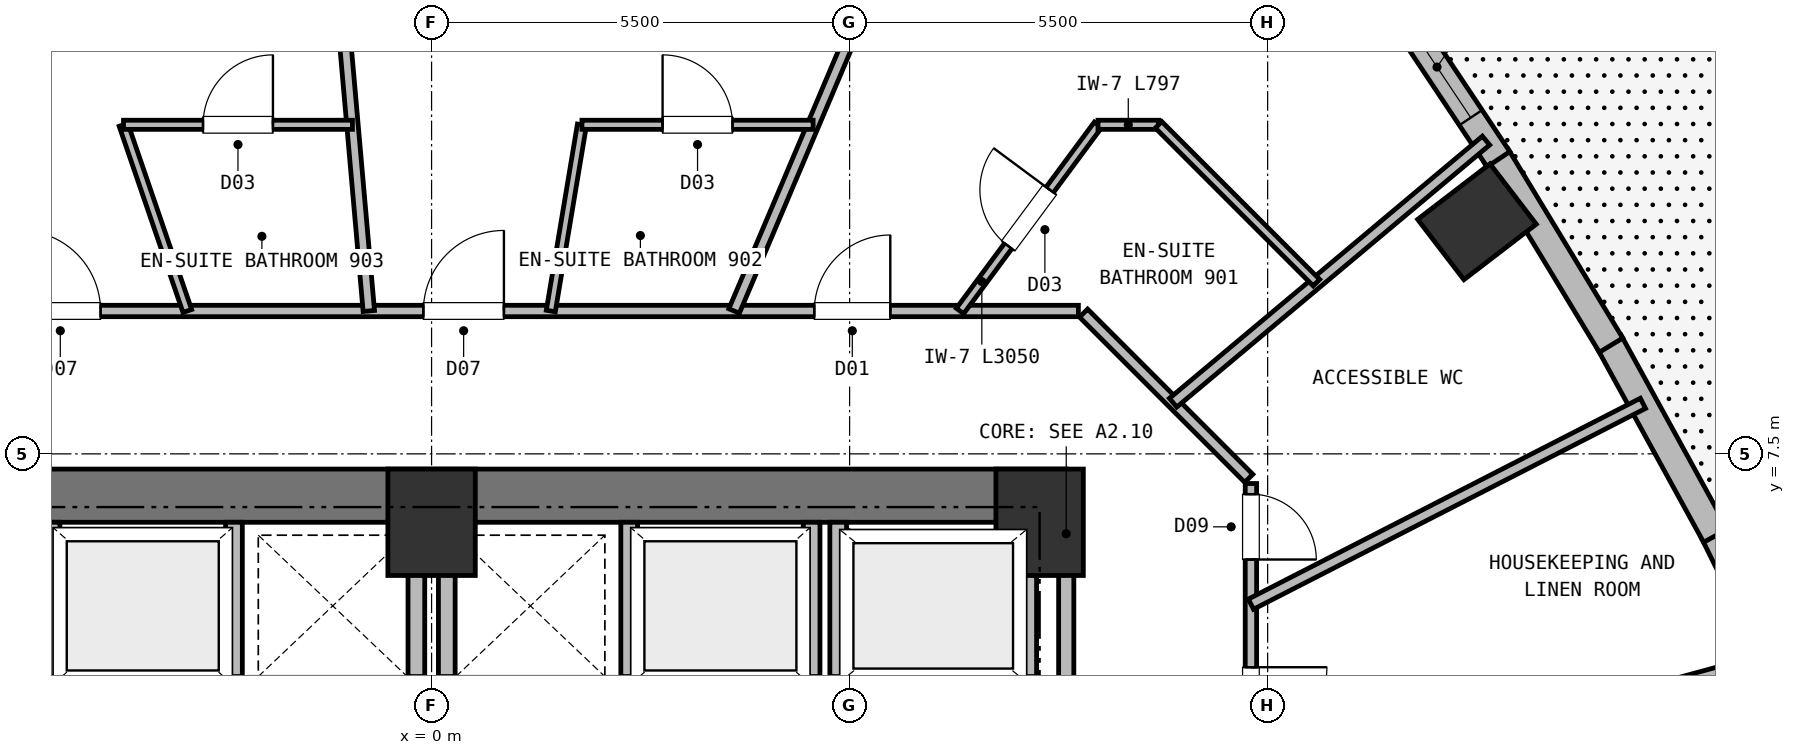
"""IFC4 building model, lengths in metres.
Left out: names, types, materials, properties, quantities, classifications, styles, units other than length and angle.
Written with IfcOpenShell. Run it as: python <this file> out.ifc"""

import sys

from ifc_helpers import new_model, si_unit, direction, frame, frame_2d, origin, origin_2d, place, context, subcontext, project, spatial, rectangle, extrude, element, fill, save


model = new_model("IFC4")
c1 = context("Model", 3, precision=1e-05, world=origin(), true_north=direction((0.0, 1.0)))
c2 = subcontext(c1, "Body", "Model", "MODEL_VIEW")
j1 = project(units=[si_unit("LENGTHUNIT", "METRE"), si_unit("PLANEANGLEUNIT", "RADIAN")], contexts=[c1])
p1 = place(None, origin())
s1 = spatial("IfcSite", under=j1, at=p1, CompositionType="ELEMENT")
p2 = place(p1, origin())
s2 = spatial("IfcBuilding", under=s1, at=p2, CompositionType="ELEMENT")
p3 = place(p2, frame((0.0, 0.0, 30.5)))
s3 = spatial("IfcBuildingStorey", under=s2, at=p3, CompositionType="ELEMENT", Elevation=30.5)
for number, where, z_axis, x_axis in (
    (1, (8.0, 6.6, 0.0), (0.0, 0.0, 1.0), (1.0, 0.0, 0.0)),
    (2, (0.0, 6.6, 0.0), (0.0, 0.0, 1.0), (1.0, 0.0, 0.0)),
):
    element("IfcColumn", number, at=place(p3, frame(where, z_axis=z_axis, x_axis=x_axis)), inside=s3, PredefinedType="COLUMN", context=c2, shape_type="SweptSolid", body=[
        extrude(rectangle(XDim=1.15, YDim=1.4, at=origin_2d()), origin(), (0.0, 0.0, 1.0), 3.75),
    ])
p4 = place(p3, frame((-8.35, 6.95, 0.0), z_axis=(0.0, 0.0, 1.0), x_axis=(1.0, 0.0, 0.0)))
e3 = element("IfcWall", 3, at=p4, inside=s3, PredefinedType="SHEAR", context=c2, shape_type="SweptSolid", body=[
    extrude(rectangle(XDim=16.7, YDim=0.7, at=frame_2d((8.35, 0.0))), origin(), (0.0, 0.0, 1.0), 3.5),
])
p5 = place(p3, frame((13.754, 10.554, 0.0), z_axis=(0.0, 0.0, 1.0), x_axis=(-0.608761429009, 0.793353340291, 0.0)))
e4 = element("IfcColumn", 4, at=p5, inside=s3, PredefinedType="COLUMN", context=c2, shape_type="SweptSolid", body=[
    extrude(rectangle(XDim=1.0, YDim=1.2, at=origin_2d()), origin(), (0.0, 0.0, 1.0), 3.75),
])
p6 = place(p3, frame((16.871, 6.468, 0.0), z_axis=(0.0, 0.0, 1.0), x_axis=(0.44365878996, -0.896195781117, 0.0)))
e5 = element("IfcWall", 5, at=p6, inside=s3, PredefinedType="SOLIDWALL", context=c2, shape_type="SweptSolid", body=[
    extrude(rectangle(XDim=2.915, YDim=0.36, at=frame_2d((1.458, 0.0))), origin(), (0.0, 0.0, 1.0), 3.5),
])
p7 = place(p3, frame((15.493, 8.974, 0.0), z_axis=(0.0, 0.0, 1.0), x_axis=(0.481319495438, -0.876545231754, 0.0)))
e6 = element("IfcWall", 6, at=p7, inside=s3, PredefinedType="SOLIDWALL", context=c2, shape_type="SweptSolid", body=[
    extrude(rectangle(XDim=2.909, YDim=0.36, at=frame_2d((1.455, 0.0))), origin(), (0.0, 0.0, 1.0), 3.5),
])
p8 = place(p3, frame((14.01, 11.419, 0.0), z_axis=(0.0, 0.0, 1.0), x_axis=(0.518463491903, -0.855099764685, 0.0)))
e7 = element("IfcWall", 7, at=p8, inside=s3, PredefinedType="SOLIDWALL", context=c2, shape_type="SweptSolid", body=[
    extrude(rectangle(XDim=2.91, YDim=0.36, at=frame_2d((1.455, 0.0))), origin(), (0.0, 0.0, 1.0), 3.5),
])
p9 = place(p3, frame((12.421, 13.802, 0.0), z_axis=(0.0, 0.0, 1.0), x_axis=(0.554410222631, -0.832243537099, 0.0)))
e8 = element("IfcWall", 8, at=p9, inside=s3, PredefinedType="SOLIDWALL", context=c2, shape_type="SweptSolid", body=[
    extrude(rectangle(XDim=2.915, YDim=0.36, at=frame_2d((1.458, 0.0))), origin(), (0.0, 0.0, 1.0), 3.5),
])
p10 = place(p9, frame((0.657, 0.0, 0.72)))
e9 = element("IfcOpeningElement", 9, at=p10, cuts=e8, PredefinedType="OPENING", context=c2, shape_type="SweptSolid", body=[
    extrude(rectangle(XDim=1.6, YDim=1.88, at=frame_2d((0.8, 0.94))), frame((0.0, 0.19, 0.0), z_axis=(0.0, -1.0, 0.0), x_axis=(1.0, 0.0, 0.0)), (0.0, 0.0, 1.0), 0.38),
])
p11 = place(p3, frame((5.35, 4.57, 0.0), z_axis=(0.0, 0.0, 1.0), x_axis=(0.0, 1.0, 0.0)))
e10 = element("IfcWall", 10, at=p11, inside=s3, PredefinedType="PARTITIONING", context=c2, shape_type="SweptSolid", body=[
    extrude(rectangle(XDim=2.03, YDim=0.22, at=frame_2d((1.015, 0.0))), origin(), (0.0, 0.0, 1.0), 3.5),
])
p12 = place(p3, frame((7.85, 4.57, 0.0), z_axis=(0.0, 0.0, 1.0), x_axis=(0.0, 1.0, 0.0)))
e11 = element("IfcWall", 11, at=p12, inside=s3, PredefinedType="PARTITIONING", context=c2, shape_type="SweptSolid", body=[
    extrude(rectangle(XDim=2.03, YDim=0.22, at=frame_2d((1.015, 0.0))), origin(), (0.0, 0.0, 1.0), 3.08),
])
for number, where, z_axis, x_axis in (
    (12, (-5.0, 4.57, 0.0), (0.0, 0.0, 1.0), (0.0, 1.0, 0.0)),
    (13, (-2.6, 4.57, 0.0), (0.0, 0.0, 1.0), (0.0, 1.0, 0.0)),
    (14, (2.6, 4.57, 0.0), (0.0, 0.0, 1.0), (0.0, 1.0, 0.0)),
    (15, (5.0, 4.57, 0.0), (0.0, 0.0, 1.0), (0.0, 1.0, 0.0)),
    (16, (-0.2, 4.57, 0.0), (0.0, 0.0, 1.0), (0.0, 1.0, 0.0)),
    (17, (0.2, 4.57, 0.0), (0.0, 0.0, 1.0), (0.0, 1.0, 0.0)),
):
    element("IfcWall", number, at=place(p3, frame(where, z_axis=z_axis, x_axis=x_axis)), inside=s3, PredefinedType="PARTITIONING", context=c2, shape_type="SweptSolid", body=[
        extrude(rectangle(XDim=2.03, YDim=0.22, at=frame_2d((1.015, 0.0))), origin(), (0.0, 0.0, 1.0), 3.5),
    ])
p13 = place(p3, frame((8.35, 1.25, 0.0), z_axis=(0.0, 0.0, 1.0), x_axis=(0.0, 1.0, 0.0)))
e18 = element("IfcWall", 18, at=p13, inside=s3, PredefinedType="PARTITIONING", context=c2, shape_type="SweptSolid", body=[
    extrude(rectangle(XDim=5.3, YDim=0.2, at=frame_2d((2.65, 0.0))), origin(), (0.0, 0.0, 1.0), 3.5),
])
p14 = place(p13, frame((0.95, 0.0, 0.0)))
e19 = element("IfcOpeningElement", 19, at=p14, cuts=e18, PredefinedType="OPENING", context=c2, shape_type="SweptSolid", body=[
    extrude(rectangle(XDim=1.15, YDim=2.15, at=frame_2d((0.575, 1.075))), frame((0.0, 0.11, 0.0), z_axis=(0.0, -1.0, 0.0), x_axis=(1.0, 0.0, 0.0)), (0.0, 0.0, 1.0), 0.22),
])
p15 = place(p3, frame((10.78, 7.11, 0.0), z_axis=(0.0, 0.0, 1.0), x_axis=(0.0, -1.0, 0.0)))
e20 = element("IfcWall", 20, at=p15, inside=s3, PredefinedType="PARTITIONING", context=c2, shape_type="SweptSolid", body=[
    extrude(rectangle(XDim=14.22, YDim=0.15, at=frame_2d((7.11, 0.0))), origin(), (0.0, 0.0, 1.0), 3.12),
])
p16 = place(p15, frame((0.14, 0.0, 0.0)))
e21 = element("IfcOpeningElement", 21, at=p16, cuts=e20, PredefinedType="OPENING", context=c2, shape_type="SweptSolid", body=[
    extrude(rectangle(XDim=0.86, YDim=2.05, at=frame_2d((0.43, 1.025))), frame((0.0, 0.085, 0.0), z_axis=(0.0, -1.0, 0.0), x_axis=(1.0, 0.0, 0.0)), (0.0, 0.0, 1.0), 0.17),
])
p17 = place(p15, frame((2.417, 0.0, 0.0)))
e22 = element("IfcOpeningElement", 22, at=p17, cuts=e20, PredefinedType="OPENING", context=c2, shape_type="SweptSolid", body=[
    extrude(rectangle(XDim=1.0, YDim=2.15, at=frame_2d((0.5, 1.075))), frame((0.0, 0.085, 0.0), z_axis=(0.0, -1.0, 0.0), x_axis=(1.0, 0.0, 0.0)), (0.0, 0.0, 1.0), 0.17),
])
p18 = place(p15, frame((5.115, 0.0, 0.0)))
e23 = element("IfcOpeningElement", 23, at=p18, cuts=e20, PredefinedType="OPENING", context=c2, shape_type="SweptSolid", body=[
    extrude(rectangle(XDim=1.0, YDim=2.15, at=frame_2d((0.5, 1.075))), frame((0.0, 0.085, 0.0), z_axis=(0.0, -1.0, 0.0), x_axis=(1.0, 0.0, 0.0)), (0.0, 0.0, 1.0), 0.17),
])
p19 = place(p15, frame((10.639, 0.0, 0.0)))
e24 = element("IfcOpeningElement", 24, at=p19, cuts=e20, PredefinedType="OPENING", context=c2, shape_type="SweptSolid", body=[
    extrude(rectangle(XDim=1.06, YDim=2.15, at=frame_2d((0.53, 1.075))), frame((0.0, 0.085, 0.0), z_axis=(0.0, -1.0, 0.0), x_axis=(1.0, 0.0, 0.0)), (0.0, 0.0, 1.0), 0.17),
])
p20 = place(p3, frame((8.578, 9.352, 0.0), z_axis=(0.0, 0.0, 1.0), x_axis=(0.707067066127, -0.707146494016, 0.0)))
e25 = element("IfcWall", 25, at=p20, inside=s3, PredefinedType="PARTITIONING", context=c2, shape_type="SweptSolid", body=[
    extrude(rectangle(XDim=3.074, YDim=0.15, at=frame_2d((1.537, 0.0))), origin(), (0.0, 0.0, 1.0), 3.5),
])
p21 = place(p3, frame((-8.51, 9.38, 0.0), z_axis=(0.0, 0.0, 1.0), x_axis=(1.0, 0.0, 0.0)))
e26 = element("IfcWall", 26, at=p21, inside=s3, PredefinedType="PARTITIONING", context=c2, shape_type="SweptSolid", body=[
    extrude(rectangle(XDim=17.02, YDim=0.15, at=frame_2d((8.51, 0.0))), origin(), (0.0, 0.0, 1.0), 3.5),
])
p22 = place(p21, frame((13.545, 0.0, 0.0)))
e27 = element("IfcOpeningElement", 27, at=p22, cuts=e26, PredefinedType="OPENING", context=c2, shape_type="SweptSolid", body=[
    extrude(rectangle(XDim=1.0, YDim=2.15, at=frame_2d((0.5, 1.075))), frame((0.0, 0.085, 0.0), z_axis=(0.0, -1.0, 0.0), x_axis=(1.0, 0.0, 0.0)), (0.0, 0.0, 1.0), 0.17),
])
p23 = place(p21, frame((3.095, 0.0, 0.0)))
e28 = element("IfcOpeningElement", 28, at=p23, cuts=e26, PredefinedType="OPENING", context=c2, shape_type="SweptSolid", body=[
    extrude(rectangle(XDim=1.06, YDim=2.15, at=frame_2d((0.53, 1.075))), frame((0.0, 0.085, 0.0), z_axis=(0.0, -1.0, 0.0), x_axis=(1.0, 0.0, 0.0)), (0.0, 0.0, 1.0), 0.17),
])
p24 = place(p21, frame((8.402, 0.0, 0.0)))
e29 = element("IfcOpeningElement", 29, at=p24, cuts=e26, PredefinedType="OPENING", context=c2, shape_type="SweptSolid", body=[
    extrude(rectangle(XDim=1.06, YDim=2.15, at=frame_2d((0.53, 1.075))), frame((0.0, 0.085, 0.0), z_axis=(0.0, -1.0, 0.0), x_axis=(1.0, 0.0, 0.0)), (0.0, 0.0, 1.0), 0.17),
])
p25 = place(p3, frame((9.756, 8.174, 0.0), z_axis=(0.0, 0.0, 1.0), x_axis=(0.766556770399, 0.642176547186, 0.0)))
e30 = element("IfcWall", 30, at=p25, inside=s3, PredefinedType="PARTITIONING", context=c2, shape_type="SweptSolid", body=[
    extrude(rectangle(XDim=5.37, YDim=0.15, at=frame_2d((2.685, 0.0))), origin(), (0.0, 0.0, 1.0), 3.5),
])
p26 = place(p3, frame((6.952, 9.38, 0.0), z_axis=(0.0, 0.0, 1.0), x_axis=(0.595378789074, 0.80344514282, 0.0)))
e31 = element("IfcWall", 31, at=p26, inside=s3, PredefinedType="PARTITIONING", context=c2, shape_type="SweptSolid", body=[
    extrude(rectangle(XDim=3.05, YDim=0.12, at=frame_2d((1.525, 0.0))), origin(), (0.0, 0.0, 1.0), 3.5),
])
p27 = place(p26, frame((1.065, 0.0, 0.0)))
e32 = element("IfcOpeningElement", 32, at=p27, cuts=e31, PredefinedType="OPENING", context=c2, shape_type="SweptSolid", body=[
    extrude(rectangle(XDim=0.92, YDim=2.1, at=frame_2d((0.46, 1.05))), frame((0.0, 0.07, 0.0), z_axis=(0.0, -1.0, 0.0), x_axis=(1.0, 0.0, 0.0)), (0.0, 0.0, 1.0), 0.14),
])
p28 = place(p3, frame((8.768, 11.83, 0.0), z_axis=(0.0, 0.0, 1.0), x_axis=(1.0, 0.0, 0.0)))
e33 = element("IfcWall", 33, at=p28, inside=s3, PredefinedType="PARTITIONING", context=c2, shape_type="SweptSolid", body=[
    extrude(rectangle(XDim=0.797, YDim=0.12, at=frame_2d((0.398, 0.0))), origin(), (0.0, 0.0, 1.0), 3.5),
])
p29 = place(p3, frame((9.565, 11.83, 0.0), z_axis=(0.0, 0.0, 1.0), x_axis=(0.707106781187, -0.707106781187, 0.0)))
e34 = element("IfcWall", 34, at=p29, inside=s3, PredefinedType="PARTITIONING", context=c2, shape_type="SweptSolid", body=[
    extrude(rectangle(XDim=2.938, YDim=0.12, at=frame_2d((1.469, 0.0))), origin(), (0.0, 0.0, 1.0), 3.5),
])
p30 = place(p3, frame((3.98, 9.38, 0.0), z_axis=(0.0, 0.0, 1.0), x_axis=(0.390626405148, 0.920549298843, 0.0)))
e35 = element("IfcWall", 35, at=p30, inside=s3, PredefinedType="PARTITIONING", context=c2, shape_type="SweptSolid", body=[
    extrude(rectangle(XDim=10.728, YDim=0.15, at=frame_2d((5.364, 0.0))), origin(), (0.0, 0.0, 1.0), 3.5),
])
p31 = place(p3, frame((1.569, 9.38, 0.0), z_axis=(0.0, 0.0, 1.0), x_axis=(0.165004545821, 0.98629280635, 0.0)))
e36 = element("IfcWall", 36, at=p31, inside=s3, PredefinedType="PARTITIONING", context=c2, shape_type="SweptSolid", body=[
    extrude(rectangle(XDim=2.484, YDim=0.12, at=frame_2d((1.242, 0.0))), origin(), (0.0, 0.0, 1.0), 3.5),
])
p32 = place(p3, frame((1.979, 11.83, 0.0), z_axis=(0.0, 0.0, 1.0), x_axis=(1.0, 0.0, 0.0)))
e37 = element("IfcWall", 37, at=p32, inside=s3, PredefinedType="PARTITIONING", context=c2, shape_type="SweptSolid", body=[
    extrude(rectangle(XDim=3.042, YDim=0.12, at=frame_2d((1.521, 0.0))), origin(), (0.0, 0.0, 1.0), 3.5),
])
p33 = place(p32, frame((1.061, 0.0, 0.0)))
e38 = element("IfcOpeningElement", 38, at=p33, cuts=e37, PredefinedType="OPENING", context=c2, shape_type="SweptSolid", body=[
    extrude(rectangle(XDim=0.92, YDim=2.1, at=frame_2d((0.46, 1.05))), frame((0.0, 0.07, 0.0), z_axis=(0.0, -1.0, 0.0), x_axis=(1.0, 0.0, 0.0)), (0.0, 0.0, 1.0), 0.14),
])
p34 = place(p3, frame((-0.826, 9.38, 0.0), z_axis=(0.0, 0.0, 1.0), x_axis=(-0.087674603254, 0.996149167517, 0.0)))
e39 = element("IfcWall", 39, at=p34, inside=s3, PredefinedType="PARTITIONING", context=c2, shape_type="SweptSolid", body=[
    extrude(rectangle(XDim=15.797, YDim=0.15, at=frame_2d((7.898, 0.0))), origin(), (0.0, 0.0, 1.0), 3.5),
])
p35 = place(p3, frame((-4.053, 11.83, 0.0), z_axis=(0.0, 0.0, 1.0), x_axis=(0.324078497959, -0.946030193578, 0.0)))
e40 = element("IfcWall", 40, at=p35, inside=s3, PredefinedType="PARTITIONING", context=c2, shape_type="SweptSolid", body=[
    extrude(rectangle(XDim=2.59, YDim=0.12, at=frame_2d((1.295, 0.0))), origin(), (0.0, 0.0, 1.0), 3.5),
])
p36 = place(p3, frame((-4.053, 11.83, 0.0), z_axis=(0.0, 0.0, 1.0), x_axis=(1.0, 0.0, 0.0)))
e41 = element("IfcWall", 41, at=p36, inside=s3, PredefinedType="PARTITIONING", context=c2, shape_type="SweptSolid", body=[
    extrude(rectangle(XDim=3.012, YDim=0.12, at=frame_2d((1.506, 0.0))), origin(), (0.0, 0.0, 1.0), 3.5),
])
p37 = place(p36, frame((1.046, 0.0, 0.0)))
e42 = element("IfcOpeningElement", 42, at=p37, cuts=e41, PredefinedType="OPENING", context=c2, shape_type="SweptSolid", body=[
    extrude(rectangle(XDim=0.92, YDim=2.1, at=frame_2d((0.46, 1.05))), frame((0.0, 0.07, 0.0), z_axis=(0.0, -1.0, 0.0), x_axis=(1.0, 0.0, 0.0)), (0.0, 0.0, 1.0), 0.14),
])
p38 = place(p3, frame((10.78, 2.943, 0.0), z_axis=(0.0, 0.0, 1.0), x_axis=(0.964692920296, 0.263377238063, 0.0)))
e43 = element("IfcWall", 43, at=p38, inside=s3, PredefinedType="PARTITIONING", context=c2, shape_type="SweptSolid", body=[
    extrude(rectangle(XDim=7.155, YDim=0.15, at=frame_2d((3.578, 0.0))), origin(), (0.0, 0.0, 1.0), 3.5),
])
p39 = place(p3, frame((10.78, 5.522, 0.0), z_axis=(0.0, 0.0, 1.0), x_axis=(0.889994161799, 0.455971920149, 0.0)))
e44 = element("IfcWall", 44, at=p39, inside=s3, PredefinedType="PARTITIONING", context=c2, shape_type="SweptSolid", body=[
    extrude(rectangle(XDim=5.795, YDim=0.15, at=frame_2d((2.897, 0.0))), origin(), (0.0, 0.0, 1.0), 3.5),
])
p40 = place(p10, origin())
e45 = element("IfcWindow", 45, at=p40, inside=s3, PartitioningType="SINGLE_PANEL", PredefinedType="WINDOW", context=c2, shape_type="SweptSolid", body=[
    extrude(rectangle(XDim=1.6, YDim=1.88, at=frame_2d((0.8, 0.94))), frame((0.0, 0.03, 0.0), z_axis=(0.0, -1.0, 0.0), x_axis=(1.0, 0.0, 0.0)), (0.0, 0.0, 1.0), 0.06),
])
fill(e9, e45)
p41 = place(p27, origin())
e46 = element("IfcDoor", 46, at=p41, inside=s3, OperationType="SINGLE_SWING_RIGHT", PredefinedType="DOOR", context=c2, shape_type="SweptSolid", body=[
    extrude(rectangle(XDim=0.92, YDim=2.1, at=frame_2d((0.46, 1.05))), frame((0.0, 0.025, 0.0), z_axis=(0.0, -1.0, 0.0), x_axis=(1.0, 0.0, 0.0)), (0.0, 0.0, 1.0), 0.05),
])
fill(e32, e46)
p42 = place(p33, origin())
e47 = element("IfcDoor", 47, at=p42, inside=s3, OperationType="SINGLE_SWING_LEFT", PredefinedType="DOOR", context=c2, shape_type="SweptSolid", body=[
    extrude(rectangle(XDim=0.92, YDim=2.1, at=frame_2d((0.46, 1.05))), frame((0.0, 0.025, 0.0), z_axis=(0.0, -1.0, 0.0), x_axis=(1.0, 0.0, 0.0)), (0.0, 0.0, 1.0), 0.05),
])
fill(e38, e47)
p43 = place(p37, origin())
e48 = element("IfcDoor", 48, at=p43, inside=s3, OperationType="SINGLE_SWING_RIGHT", PredefinedType="DOOR", context=c2, shape_type="SweptSolid", body=[
    extrude(rectangle(XDim=0.92, YDim=2.1, at=frame_2d((0.46, 1.05))), frame((0.0, 0.025, 0.0), z_axis=(0.0, -1.0, 0.0), x_axis=(1.0, 0.0, 0.0)), (0.0, 0.0, 1.0), 0.05),
])
fill(e42, e48)
p44 = place(p16, origin())
e49 = element("IfcDoor", 49, at=p44, inside=s3, OperationType="SINGLE_SWING_RIGHT", PredefinedType="DOOR", context=c2, shape_type="SweptSolid", body=[
    extrude(rectangle(XDim=0.86, YDim=2.05, at=frame_2d((0.43, 1.025))), frame((0.0, 0.025, 0.0), z_axis=(0.0, -1.0, 0.0), x_axis=(1.0, 0.0, 0.0)), (0.0, 0.0, 1.0), 0.05),
])
fill(e21, e49)
p45 = place(p17, origin())
e50 = element("IfcDoor", 50, at=p45, inside=s3, OperationType="SINGLE_SWING_LEFT", PredefinedType="DOOR", context=c2, shape_type="SweptSolid", body=[
    extrude(rectangle(XDim=1.0, YDim=2.15, at=frame_2d((0.5, 1.075))), frame((0.0, 0.025, 0.0), z_axis=(0.0, -1.0, 0.0), x_axis=(1.0, 0.0, 0.0)), (0.0, 0.0, 1.0), 0.05),
])
fill(e22, e50)
p46 = place(p22, origin())
e51 = element("IfcDoor", 51, at=p46, inside=s3, OperationType="SINGLE_SWING_RIGHT", PredefinedType="DOOR", context=c2, shape_type="SweptSolid", body=[
    extrude(rectangle(XDim=1.0, YDim=2.15, at=frame_2d((0.5, 1.075))), frame((0.0, 0.025, 0.0), z_axis=(0.0, -1.0, 0.0), x_axis=(1.0, 0.0, 0.0)), (0.0, 0.0, 1.0), 0.05),
])
fill(e27, e51)
p47 = place(p23, origin())
e52 = element("IfcDoor", 52, at=p47, inside=s3, OperationType="SINGLE_SWING_LEFT", PredefinedType="DOOR", context=c2, shape_type="SweptSolid", body=[
    extrude(rectangle(XDim=1.06, YDim=2.15, at=frame_2d((0.53, 1.075))), frame((0.0, 0.025, 0.0), z_axis=(0.0, -1.0, 0.0), x_axis=(1.0, 0.0, 0.0)), (0.0, 0.0, 1.0), 0.05),
])
fill(e28, e52)
p48 = place(p24, origin())
e53 = element("IfcDoor", 53, at=p48, inside=s3, OperationType="SINGLE_SWING_RIGHT", PredefinedType="DOOR", context=c2, shape_type="SweptSolid", body=[
    extrude(rectangle(XDim=1.06, YDim=2.15, at=frame_2d((0.53, 1.075))), frame((0.0, 0.025, 0.0), z_axis=(0.0, -1.0, 0.0), x_axis=(1.0, 0.0, 0.0)), (0.0, 0.0, 1.0), 0.05),
])
fill(e29, e53)
save(model, sys.argv[1])
